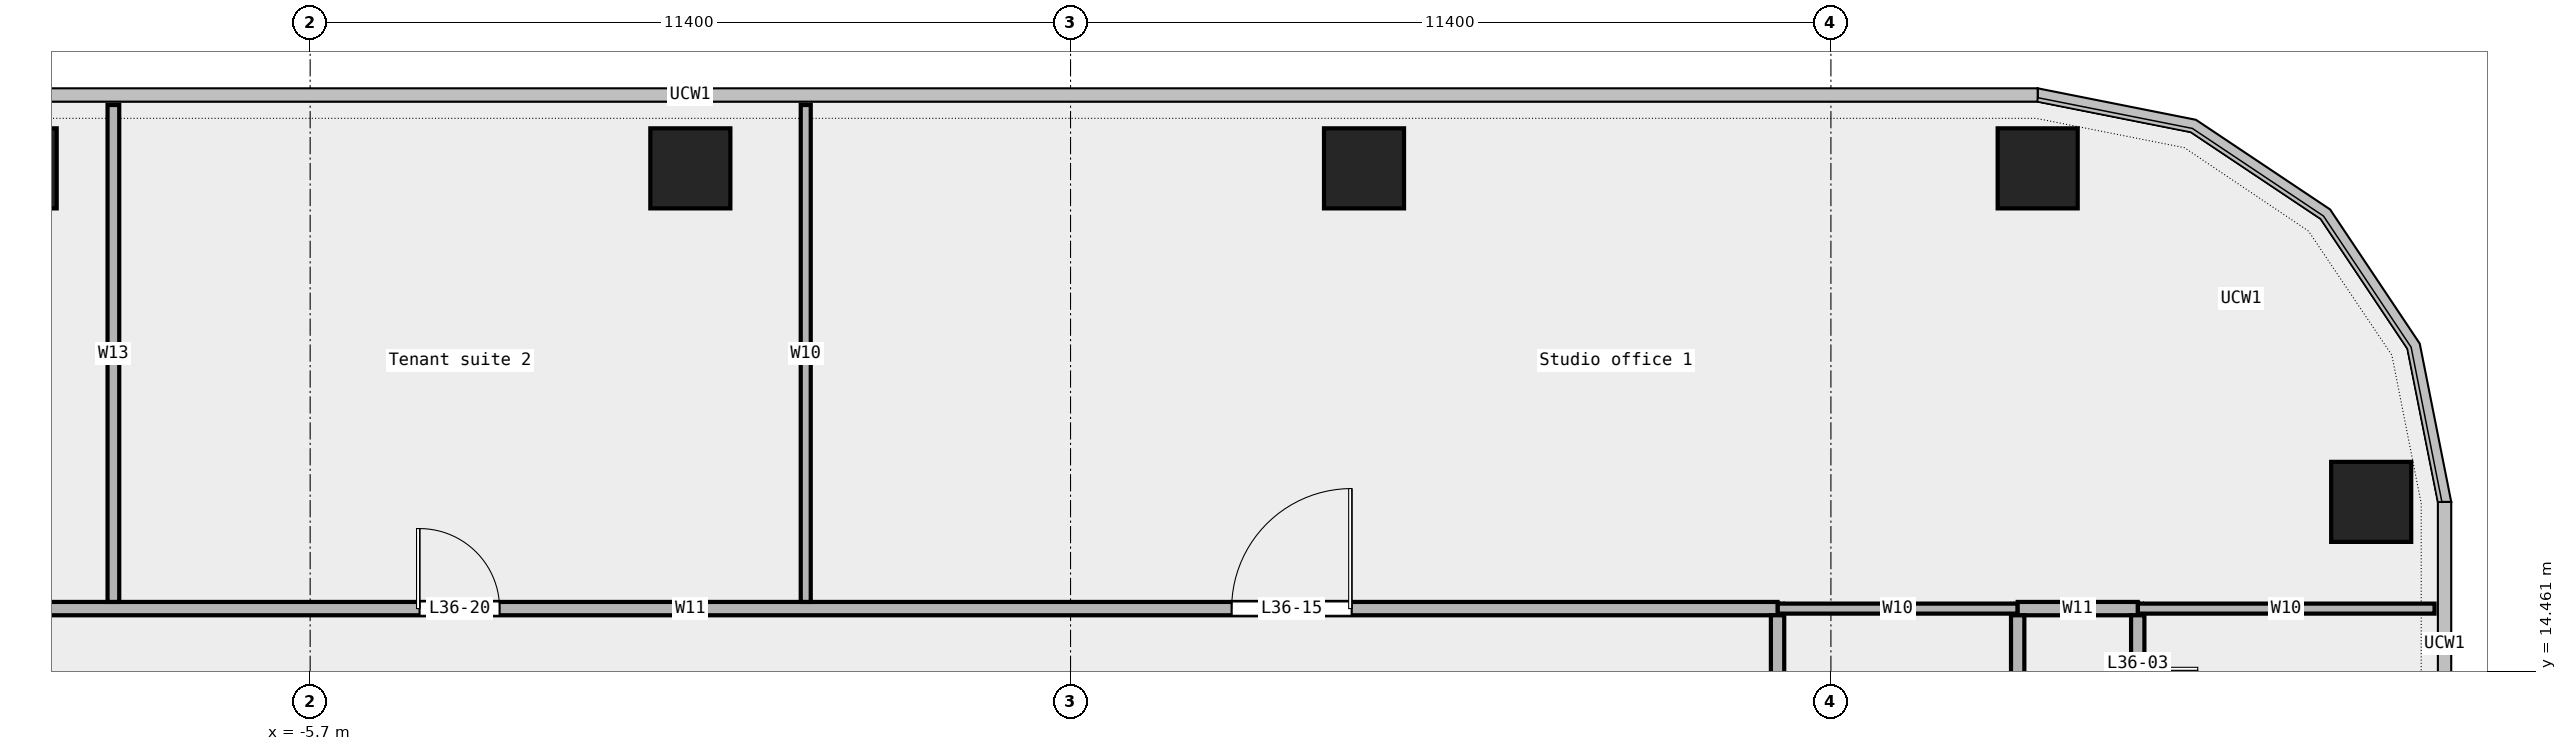
"""IFC4 building model, lengths in metres.
Left out: names, types, materials, properties, quantities, classifications, styles, units other than length and angle.
Written with IfcOpenShell. Run it as: python <this file> out.ifc"""

import sys

from ifc_helpers import new_model, si_unit, direction, frame, frame_2d, origin, origin_2d, place, context, subcontext, project, spatial, rectangle, extrude, element, fill, save


model = new_model("IFC4")
c1 = context("Model", 3, precision=1e-05, world=origin(), true_north=direction((0.0, 1.0)))
c2 = subcontext(c1, "Body", "Model", "MODEL_VIEW")
j1 = project(units=[si_unit("LENGTHUNIT", "METRE"), si_unit("PLANEANGLEUNIT", "RADIAN")], contexts=[c1])
p1 = place(None, origin())
s1 = spatial("IfcSite", under=j1, at=p1, CompositionType="ELEMENT")
p2 = place(p1, origin())
s2 = spatial("IfcBuilding", under=s1, at=p2, CompositionType="ELEMENT")
p3 = place(p2, frame((0.0, 0.0, 177.0)))
s3 = spatial("IfcBuildingStorey", under=s2, at=p3, CompositionType="ELEMENT", Elevation=177.0)
for number, where, z_axis, x_axis in (
    (1, (25.2, 17.0, 0.0), (0.0, 0.0, 1.0), (1.0, 0.0, 0.0)),
    (2, (20.2, 22.0, 0.0), (0.0, 0.0, 1.0), (1.0, 0.0, 0.0)),
    (3, (10.1, 22.0, 0.0), (0.0, 0.0, 1.0), (1.0, 0.0, 0.0)),
    (4, (0.0, 22.0, 0.0), (0.0, 0.0, 1.0), (1.0, 0.0, 0.0)),
    (5, (-10.1, 22.0, 0.0), (0.0, 0.0, 1.0), (1.0, 0.0, 0.0)),
):
    element("IfcColumn", number, at=place(p3, frame(where, z_axis=z_axis, x_axis=x_axis)), inside=s3, PredefinedType="COLUMN", context=c2, shape_type="SweptSolid", body=[
        extrude(rectangle(XDim=1.2, YDim=1.2, at=origin_2d()), origin(), (0.0, 0.0, 1.0), 3.6),
    ])
p4 = place(p3, frame((16.3, 15.4, 0.0), z_axis=(0.0, 0.0, 1.0), x_axis=(1.0, 0.0, 0.0)))
e6 = element("IfcWall", 6, at=p4, inside=s3, PredefinedType="PARTITIONING", context=c2, shape_type="SweptSolid", body=[
    extrude(rectangle(XDim=3.6, YDim=0.15, at=frame_2d((1.8, 0.0))), origin(), (0.0, 0.0, 1.0), 3.6),
])
p5 = place(p3, frame((21.7, 15.4, 0.0), z_axis=(0.0, 0.0, 1.0), x_axis=(1.0, 0.0, 0.0)))
e7 = element("IfcWall", 7, at=p5, inside=s3, PredefinedType="PARTITIONING", context=c2, shape_type="SweptSolid", body=[
    extrude(rectangle(XDim=4.45, YDim=0.15, at=frame_2d((2.225, 0.0))), origin(), (0.0, 0.0, 1.0), 3.6),
])
p6 = place(p3, frame((-16.3, 15.4, 0.0), z_axis=(0.0, 0.0, 1.0), x_axis=(1.0, 0.0, 0.0)))
e8 = element("IfcWall", 8, at=p6, inside=s3, PredefinedType="PARTITIONING", context=c2, shape_type="SweptSolid", body=[
    extrude(rectangle(XDim=32.6, YDim=0.2, at=frame_2d((16.3, 0.0))), origin(), (0.0, 0.0, 1.0), 3.6),
])
p7 = place(p6, frame((24.415, 0.0, 0.0)))
e9 = element("IfcOpeningElement", 9, at=p7, cuts=e8, PredefinedType="OPENING", context=c2, shape_type="SweptSolid", body=[
    extrude(rectangle(XDim=1.8, YDim=2.1, at=frame_2d((0.9, 1.05))), frame((0.0, 0.112, 0.0), z_axis=(0.0, -1.0, 0.0), x_axis=(1.0, 0.0, 0.0)), (0.0, 0.0, 1.0), 0.224),
])
p8 = place(p6, frame((12.24, 0.0, 0.0)))
e10 = element("IfcOpeningElement", 10, at=p8, cuts=e8, PredefinedType="OPENING", context=c2, shape_type="SweptSolid", body=[
    extrude(rectangle(XDim=1.2, YDim=2.1, at=frame_2d((0.6, 1.05))), frame((0.0, 0.112, 0.0), z_axis=(0.0, -1.0, 0.0), x_axis=(1.0, 0.0, 0.0)), (0.0, 0.0, 1.0), 0.224),
])
p9 = place(p6, frame((3.075, 0.0, 0.0)))
e11 = element("IfcOpeningElement", 11, at=p9, cuts=e8, PredefinedType="OPENING", context=c2, shape_type="SweptSolid", body=[
    extrude(rectangle(XDim=1.5, YDim=2.1, at=frame_2d((0.75, 1.05))), frame((0.0, 0.112, 0.0), z_axis=(0.0, -1.0, 0.0), x_axis=(1.0, 0.0, 0.0)), (0.0, 0.0, 1.0), 0.224),
])
p10 = place(p3, frame((19.9, 15.4, 0.0), z_axis=(0.0, 0.0, 1.0), x_axis=(1.0, 0.0, 0.0)))
e12 = element("IfcWall", 12, at=p10, inside=s3, PredefinedType="PARTITIONING", context=c2, shape_type="SweptSolid", body=[
    extrude(rectangle(XDim=1.8, YDim=0.2, at=frame_2d((0.9, 0.0))), origin(), (0.0, 0.0, 1.0), 3.6),
])
p11 = place(p3, frame((-8.65, 15.5, 0.0), z_axis=(0.0, 0.0, 1.0), x_axis=(0.0, 1.0, 0.0)))
e13 = element("IfcWall", 13, at=p11, inside=s3, PredefinedType="PARTITIONING", context=c2, shape_type="SweptSolid", body=[
    extrude(rectangle(XDim=7.45, YDim=0.175, at=frame_2d((3.725, 0.0))), origin(), (0.0, 0.0, 1.0), 3.6),
])
p12 = place(p3, frame((1.73, 15.5, 0.0), z_axis=(0.0, 0.0, 1.0), x_axis=(0.0, 1.0, 0.0)))
e14 = element("IfcWall", 14, at=p12, inside=s3, PredefinedType="PARTITIONING", context=c2, shape_type="SweptSolid", body=[
    extrude(rectangle(XDim=7.45, YDim=0.15, at=frame_2d((3.725, 0.0))), origin(), (0.0, 0.0, 1.0), 3.6),
])
p13 = place(p3, frame((16.3, 11.7, 0.0), z_axis=(0.0, 0.0, 1.0), x_axis=(0.0, 1.0, 0.0)))
e15 = element("IfcWall", 15, at=p13, inside=s3, PredefinedType="PARTITIONING", context=c2, shape_type="SweptSolid", body=[
    extrude(rectangle(XDim=3.6, YDim=0.2, at=frame_2d((1.8, 0.0))), origin(), (0.0, 0.0, 1.0), 3.6),
])
p14 = place(p3, frame((19.9, -0.75, 0.0), z_axis=(0.0, 0.0, 1.0), x_axis=(0.0, 1.0, 0.0)))
e16 = element("IfcWall", 16, at=p14, inside=s3, PredefinedType="PARTITIONING", context=c2, shape_type="SweptSolid", body=[
    extrude(rectangle(XDim=16.05, YDim=0.2, at=frame_2d((8.025, 0.0))), origin(), (0.0, 0.0, 1.0), 3.6),
])
p15 = place(p14, frame((2.455, 0.0, 0.0)))
e17 = element("IfcOpeningElement", 17, at=p15, cuts=e16, PredefinedType="OPENING", context=c2, shape_type="SweptSolid", body=[
    extrude(rectangle(XDim=0.9, YDim=2.1, at=frame_2d((0.45, 1.05))), frame((0.0, 0.112, 0.0), z_axis=(0.0, -1.0, 0.0), x_axis=(1.0, 0.0, 0.0)), (0.0, 0.0, 1.0), 0.224),
])
p16 = place(p14, frame((7.802, 0.0, 0.0)))
e18 = element("IfcOpeningElement", 18, at=p16, cuts=e16, PredefinedType="OPENING", context=c2, shape_type="SweptSolid", body=[
    extrude(rectangle(XDim=0.9, YDim=2.1, at=frame_2d((0.45, 1.05))), frame((0.0, 0.112, 0.0), z_axis=(0.0, -1.0, 0.0), x_axis=(1.0, 0.0, 0.0)), (0.0, 0.0, 1.0), 0.224),
])
p17 = place(p14, frame((12.923, 0.0, 0.0)))
e19 = element("IfcOpeningElement", 19, at=p17, cuts=e16, PredefinedType="OPENING", context=c2, shape_type="SweptSolid", body=[
    extrude(rectangle(XDim=0.9, YDim=2.1, at=frame_2d((0.45, 1.05))), frame((0.0, 0.112, 0.0), z_axis=(0.0, -1.0, 0.0), x_axis=(1.0, 0.0, 0.0)), (0.0, 0.0, 1.0), 0.224),
])
p18 = place(p3, frame((21.7, -9.0, 0.0), z_axis=(0.0, 0.0, 1.0), x_axis=(0.0, 1.0, 0.0)))
e20 = element("IfcWall", 20, at=p18, inside=s3, PredefinedType="PARTITIONING", context=c2, shape_type="SweptSolid", body=[
    extrude(rectangle(XDim=24.3, YDim=0.2, at=frame_2d((12.15, 0.0))), origin(), (0.0, 0.0, 1.0), 3.6),
])
p19 = place(p18, frame((3.583, 0.0, 0.0)))
e21 = element("IfcOpeningElement", 21, at=p19, cuts=e20, PredefinedType="OPENING", context=c2, shape_type="SweptSolid", body=[
    extrude(rectangle(XDim=0.9, YDim=2.1, at=frame_2d((0.45, 1.05))), frame((0.0, 0.112, 0.0), z_axis=(0.0, -1.0, 0.0), x_axis=(1.0, 0.0, 0.0)), (0.0, 0.0, 1.0), 0.224),
])
p20 = place(p18, frame((22.575, 0.0, 0.0)))
e22 = element("IfcOpeningElement", 22, at=p20, cuts=e20, PredefinedType="OPENING", context=c2, shape_type="SweptSolid", body=[
    extrude(rectangle(XDim=0.9, YDim=2.1, at=frame_2d((0.45, 1.05))), frame((0.0, 0.112, 0.0), z_axis=(0.0, -1.0, 0.0), x_axis=(1.0, 0.0, 0.0)), (0.0, 0.0, 1.0), 0.224),
])
p21 = place(p18, frame((14.925, 0.0, 0.0)))
e23 = element("IfcOpeningElement", 23, at=p21, cuts=e20, PredefinedType="OPENING", context=c2, shape_type="SweptSolid", body=[
    extrude(rectangle(XDim=0.9, YDim=2.1, at=frame_2d((0.45, 1.05))), frame((0.0, 0.112, 0.0), z_axis=(0.0, -1.0, 0.0), x_axis=(1.0, 0.0, 0.0)), (0.0, 0.0, 1.0), 0.224),
])
p22 = place(p7, origin())
e24 = element("IfcDoor", 24, at=p22, inside=s3, OperationType="DOUBLE_DOOR_SINGLE_SWING", PredefinedType="DOOR", context=c2, shape_type="SweptSolid", body=[
    extrude(rectangle(XDim=1.8, YDim=2.1, at=frame_2d((0.9, 1.05))), frame((0.0, 0.025, 0.0), z_axis=(0.0, -1.0, 0.0), x_axis=(1.0, 0.0, 0.0)), (0.0, 0.0, 1.0), 0.05),
])
fill(e9, e24)
p23 = place(p8, origin())
e25 = element("IfcDoor", 25, at=p23, inside=s3, OperationType="SINGLE_SWING_LEFT", PredefinedType="DOOR", context=c2, shape_type="SweptSolid", body=[
    extrude(rectangle(XDim=1.2, YDim=2.1, at=frame_2d((0.6, 1.05))), frame((0.0, 0.025, 0.0), z_axis=(0.0, -1.0, 0.0), x_axis=(1.0, 0.0, 0.0)), (0.0, 0.0, 1.0), 0.05),
])
fill(e10, e25)
save(model, sys.argv[1])
